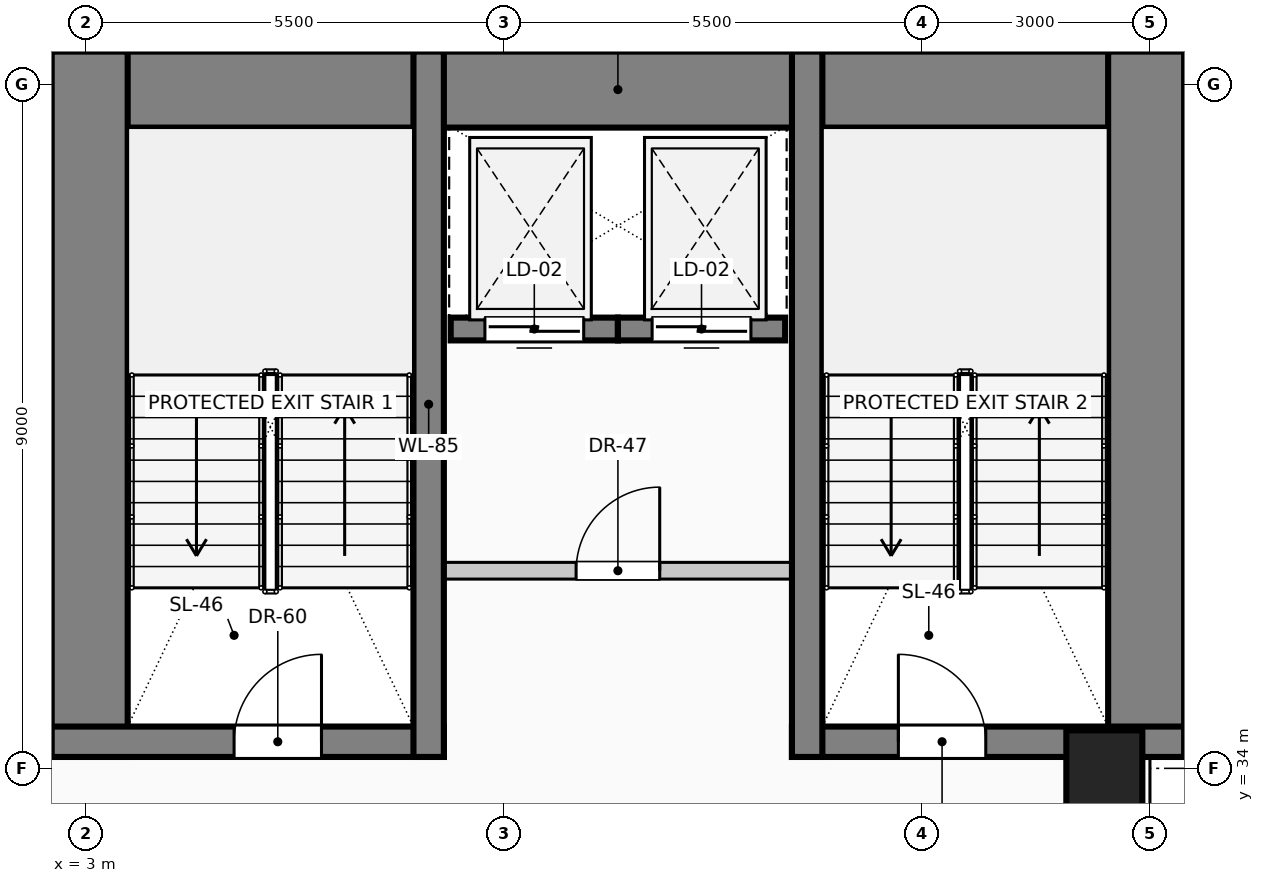
"""IFC4 building model, lengths in metres.
Left out: names, types, materials, properties, quantities, classifications, styles, units other than length and angle.
Written with IfcOpenShell. Run it as: python <this file> out.ifc"""

import sys

from ifc_helpers import new_model, si_unit, direction, frame, frame_2d, origin, origin_2d, place, context, subcontext, project, spatial, rectangle, circle, extrude, element, fill, save


model = new_model("IFC4")
c1 = context("Model", 3, precision=1e-05, world=origin(), true_north=direction((0.0, 1.0)))
c2 = subcontext(c1, "Body", "Model", "MODEL_VIEW")
j1 = project(units=[si_unit("LENGTHUNIT", "METRE"), si_unit("PLANEANGLEUNIT", "RADIAN")], contexts=[c1])
p1 = place(None, origin())
s1 = spatial("IfcSite", under=j1, at=p1, CompositionType="ELEMENT")
p2 = place(p1, origin())
s2 = spatial("IfcBuilding", under=s1, at=p2, CompositionType="ELEMENT")
p3 = place(p2, frame((0.0, 0.0, 30.6)))
s3 = spatial("IfcBuildingStorey", under=s2, at=p3, CompositionType="ELEMENT", Elevation=30.6)
p4 = place(p3, frame((2.55, 42.93, 0.0), z_axis=(0.0, 0.0, 1.0), x_axis=(1.0, 0.0, 0.0)))
e1 = element("IfcWall", 1, at=p4, inside=s3, PredefinedType="SHEAR", context=c2, shape_type="SweptSolid", body=[
    extrude(rectangle(XDim=14.9, YDim=1.0, at=frame_2d((7.45, 0.0))), origin(), (0.0, 0.0, 1.0), 4.0),
])
for number, where, z_axis, x_axis in (
    (2, (3.05, 34.15, 0.0), (0.0, 0.0, 1.0), (0.0, 1.0, 0.0)),
    (3, (16.95, 34.15, 0.0), (0.0, 0.0, 1.0), (0.0, 1.0, 0.0)),
):
    element("IfcWall", number, at=place(p3, frame(where, z_axis=z_axis, x_axis=x_axis)), inside=s3, PredefinedType="SHEAR", context=c2, shape_type="SweptSolid", body=[
        extrude(rectangle(XDim=9.28, YDim=1.0, at=frame_2d((4.64, 0.0))), origin(), (0.0, 0.0, 1.0), 4.0),
    ])
p5 = place(p3, frame((2.55, 34.35, 0.0), z_axis=(0.0, 0.0, 1.0), x_axis=(1.0, 0.0, 0.0)))
e4 = element("IfcWall", 4, at=p5, inside=s3, PredefinedType="SHEAR", context=c2, shape_type="SweptSolid", body=[
    extrude(rectangle(XDim=5.16, YDim=0.4, at=frame_2d((2.58, 0.0))), origin(), (0.0, 0.0, 1.0), 4.0),
])
p6 = place(p5, frame((2.4, 0.0, 0.0)))
e5 = element("IfcOpeningElement", 5, at=p6, cuts=e4, PredefinedType="OPENING", context=c2, shape_type="SweptSolid", body=[
    extrude(rectangle(XDim=1.15, YDim=2.2, at=frame_2d((0.575, 1.1))), frame((0.0, 0.21, 0.0), z_axis=(0.0, -1.0, 0.0), x_axis=(1.0, 0.0, 0.0)), (0.0, 0.0, 1.0), 0.42),
])
p7 = place(p3, frame((12.29, 34.35, 0.0), z_axis=(0.0, 0.0, 1.0), x_axis=(1.0, 0.0, 0.0)))
e6 = element("IfcWall", 6, at=p7, inside=s3, PredefinedType="SHEAR", context=c2, shape_type="SweptSolid", body=[
    extrude(rectangle(XDim=5.16, YDim=0.4, at=frame_2d((2.58, 0.0))), origin(), (0.0, 0.0, 1.0), 4.0),
])
p8 = place(p7, frame((1.4, 0.0, 0.0)))
e7 = element("IfcOpeningElement", 7, at=p8, cuts=e6, PredefinedType="OPENING", context=c2, shape_type="SweptSolid", body=[
    extrude(rectangle(XDim=1.15, YDim=2.2, at=frame_2d((0.575, 1.1))), frame((0.0, 0.21, 0.0), z_axis=(0.0, -1.0, 0.0), x_axis=(1.0, 0.0, 0.0)), (0.0, 0.0, 1.0), 0.42),
])
for number, where, z_axis, x_axis in (
    (8, (7.51, 34.15, 0.0), (0.0, 0.0, 1.0), (0.0, 1.0, 0.0)),
    (9, (12.49, 34.15, 0.0), (0.0, 0.0, 1.0), (0.0, 1.0, 0.0)),
):
    element("IfcWall", number, at=place(p3, frame(where, z_axis=z_axis, x_axis=x_axis)), inside=s3, PredefinedType="SHEAR", context=c2, shape_type="SweptSolid", body=[
        extrude(rectangle(XDim=9.28, YDim=0.4, at=frame_2d((4.64, 0.0))), origin(), (0.0, 0.0, 1.0), 4.0),
    ])
p9 = place(p3, frame((16.4, 34.0, 0.0), z_axis=(0.0, 0.0, 1.0), x_axis=(1.0, 0.0, 0.0)))
e10 = element("IfcColumn", 10, at=p9, inside=s3, PredefinedType="COLUMN", context=c2, shape_type="SweptSolid", body=[
    extrude(circle(Radius=0.5, at=origin_2d()), origin(), (0.0, 0.0, 1.0), 4.0),
])
p10 = place(p3, frame((10.0, 39.78, 0.0), z_axis=(0.0, 0.0, 1.0), x_axis=(-1.0, 0.0, 0.0)))
e11 = element("IfcWall", 11, at=p10, inside=s3, PredefinedType="SOLIDWALL", context=c2, shape_type="SweptSolid", body=[
    extrude(rectangle(XDim=2.2, YDim=0.3, at=frame_2d((1.1, 0.0))), origin(), (0.0, 0.0, 1.0), 4.0),
])
p11 = place(p10, frame((0.45, 0.0, 0.0)))
e12 = element("IfcOpeningElement", 12, at=p11, cuts=e11, PredefinedType="OPENING", context=c2, shape_type="SweptSolid", body=[
    extrude(rectangle(XDim=1.3, YDim=2.25, at=frame_2d((0.65, 1.125))), frame((0.0, 0.16, 0.0), z_axis=(0.0, -1.0, 0.0), x_axis=(1.0, 0.0, 0.0)), (0.0, 0.0, 1.0), 0.32),
])
p12 = place(p3, frame((12.2, 39.78, 0.0), z_axis=(0.0, 0.0, 1.0), x_axis=(-1.0, 0.0, 0.0)))
e13 = element("IfcWall", 13, at=p12, inside=s3, PredefinedType="SOLIDWALL", context=c2, shape_type="SweptSolid", body=[
    extrude(rectangle(XDim=2.2, YDim=0.3, at=frame_2d((1.1, 0.0))), origin(), (0.0, 0.0, 1.0), 4.0),
])
p13 = place(p12, frame((0.45, 0.0, 0.0)))
e14 = element("IfcOpeningElement", 14, at=p13, cuts=e13, PredefinedType="OPENING", context=c2, shape_type="SweptSolid", body=[
    extrude(rectangle(XDim=1.3, YDim=2.25, at=frame_2d((0.65, 1.125))), frame((0.0, 0.16, 0.0), z_axis=(0.0, -1.0, 0.0), x_axis=(1.0, 0.0, 0.0)), (0.0, 0.0, 1.0), 0.32),
])
p14 = place(p3, frame((7.51, 36.6, 0.0), z_axis=(0.0, 0.0, 1.0), x_axis=(1.0, 0.0, 0.0)))
e15 = element("IfcWall", 15, at=p14, inside=s3, PredefinedType="PARTITIONING", context=c2, shape_type="SweptSolid", body=[
    extrude(rectangle(XDim=4.98, YDim=0.22, at=frame_2d((2.49, 0.0))), origin(), (0.0, 0.0, 1.0), 3.7),
])
p15 = place(p14, frame((1.94, 0.0, 0.0)))
e16 = element("IfcOpeningElement", 16, at=p15, cuts=e15, PredefinedType="OPENING", context=c2, shape_type="SweptSolid", body=[
    extrude(rectangle(XDim=1.1, YDim=2.2, at=frame_2d((0.55, 1.1))), frame((0.0, 0.12, 0.0), z_axis=(0.0, -1.0, 0.0), x_axis=(1.0, 0.0, 0.0)), (0.0, 0.0, 1.0), 0.24),
])
p16 = place(p11, origin())
e17 = element("IfcDoor", 17, at=p16, inside=s3, OperationType="SLIDING_TO_LEFT", PredefinedType="DOOR", context=c2, shape_type="SweptSolid", body=[
    extrude(rectangle(XDim=1.3, YDim=2.25, at=frame_2d((0.65, 1.125))), frame((0.0, 0.025, 0.0), z_axis=(0.0, -1.0, 0.0), x_axis=(1.0, 0.0, 0.0)), (0.0, 0.0, 1.0), 0.05),
])
fill(e12, e17)
p17 = place(p13, origin())
e18 = element("IfcDoor", 18, at=p17, inside=s3, OperationType="SLIDING_TO_RIGHT", PredefinedType="DOOR", context=c2, shape_type="SweptSolid", body=[
    extrude(rectangle(XDim=1.3, YDim=2.25, at=frame_2d((0.65, 1.125))), frame((0.0, 0.025, 0.0), z_axis=(0.0, -1.0, 0.0), x_axis=(1.0, 0.0, 0.0)), (0.0, 0.0, 1.0), 0.05),
])
fill(e14, e18)
p18 = place(p6, origin())
e19 = element("IfcDoor", 19, at=p18, inside=s3, OperationType="SINGLE_SWING_RIGHT", PredefinedType="DOOR", context=c2, shape_type="SweptSolid", body=[
    extrude(rectangle(XDim=1.15, YDim=2.2, at=frame_2d((0.575, 1.1))), frame((0.0, 0.025, 0.0), z_axis=(0.0, -1.0, 0.0), x_axis=(1.0, 0.0, 0.0)), (0.0, 0.0, 1.0), 0.05),
])
fill(e5, e19)
p19 = place(p8, origin())
e20 = element("IfcDoor", 20, at=p19, inside=s3, OperationType="SINGLE_SWING_LEFT", PredefinedType="DOOR", context=c2, shape_type="SweptSolid", body=[
    extrude(rectangle(XDim=1.15, YDim=2.2, at=frame_2d((0.575, 1.1))), frame((0.0, 0.025, 0.0), z_axis=(0.0, -1.0, 0.0), x_axis=(1.0, 0.0, 0.0)), (0.0, 0.0, 1.0), 0.05),
])
fill(e7, e20)
p20 = place(p15, origin())
e21 = element("IfcDoor", 21, at=p20, inside=s3, OperationType="SINGLE_SWING_RIGHT", PredefinedType="DOOR", context=c2, shape_type="SweptSolid", body=[
    extrude(rectangle(XDim=1.1, YDim=2.2, at=frame_2d((0.55, 1.1))), frame((0.0, 0.025, 0.0), z_axis=(0.0, -1.0, 0.0), x_axis=(1.0, 0.0, 0.0)), (0.0, 0.0, 1.0), 0.05),
])
fill(e16, e21)
save(model, sys.argv[1])
